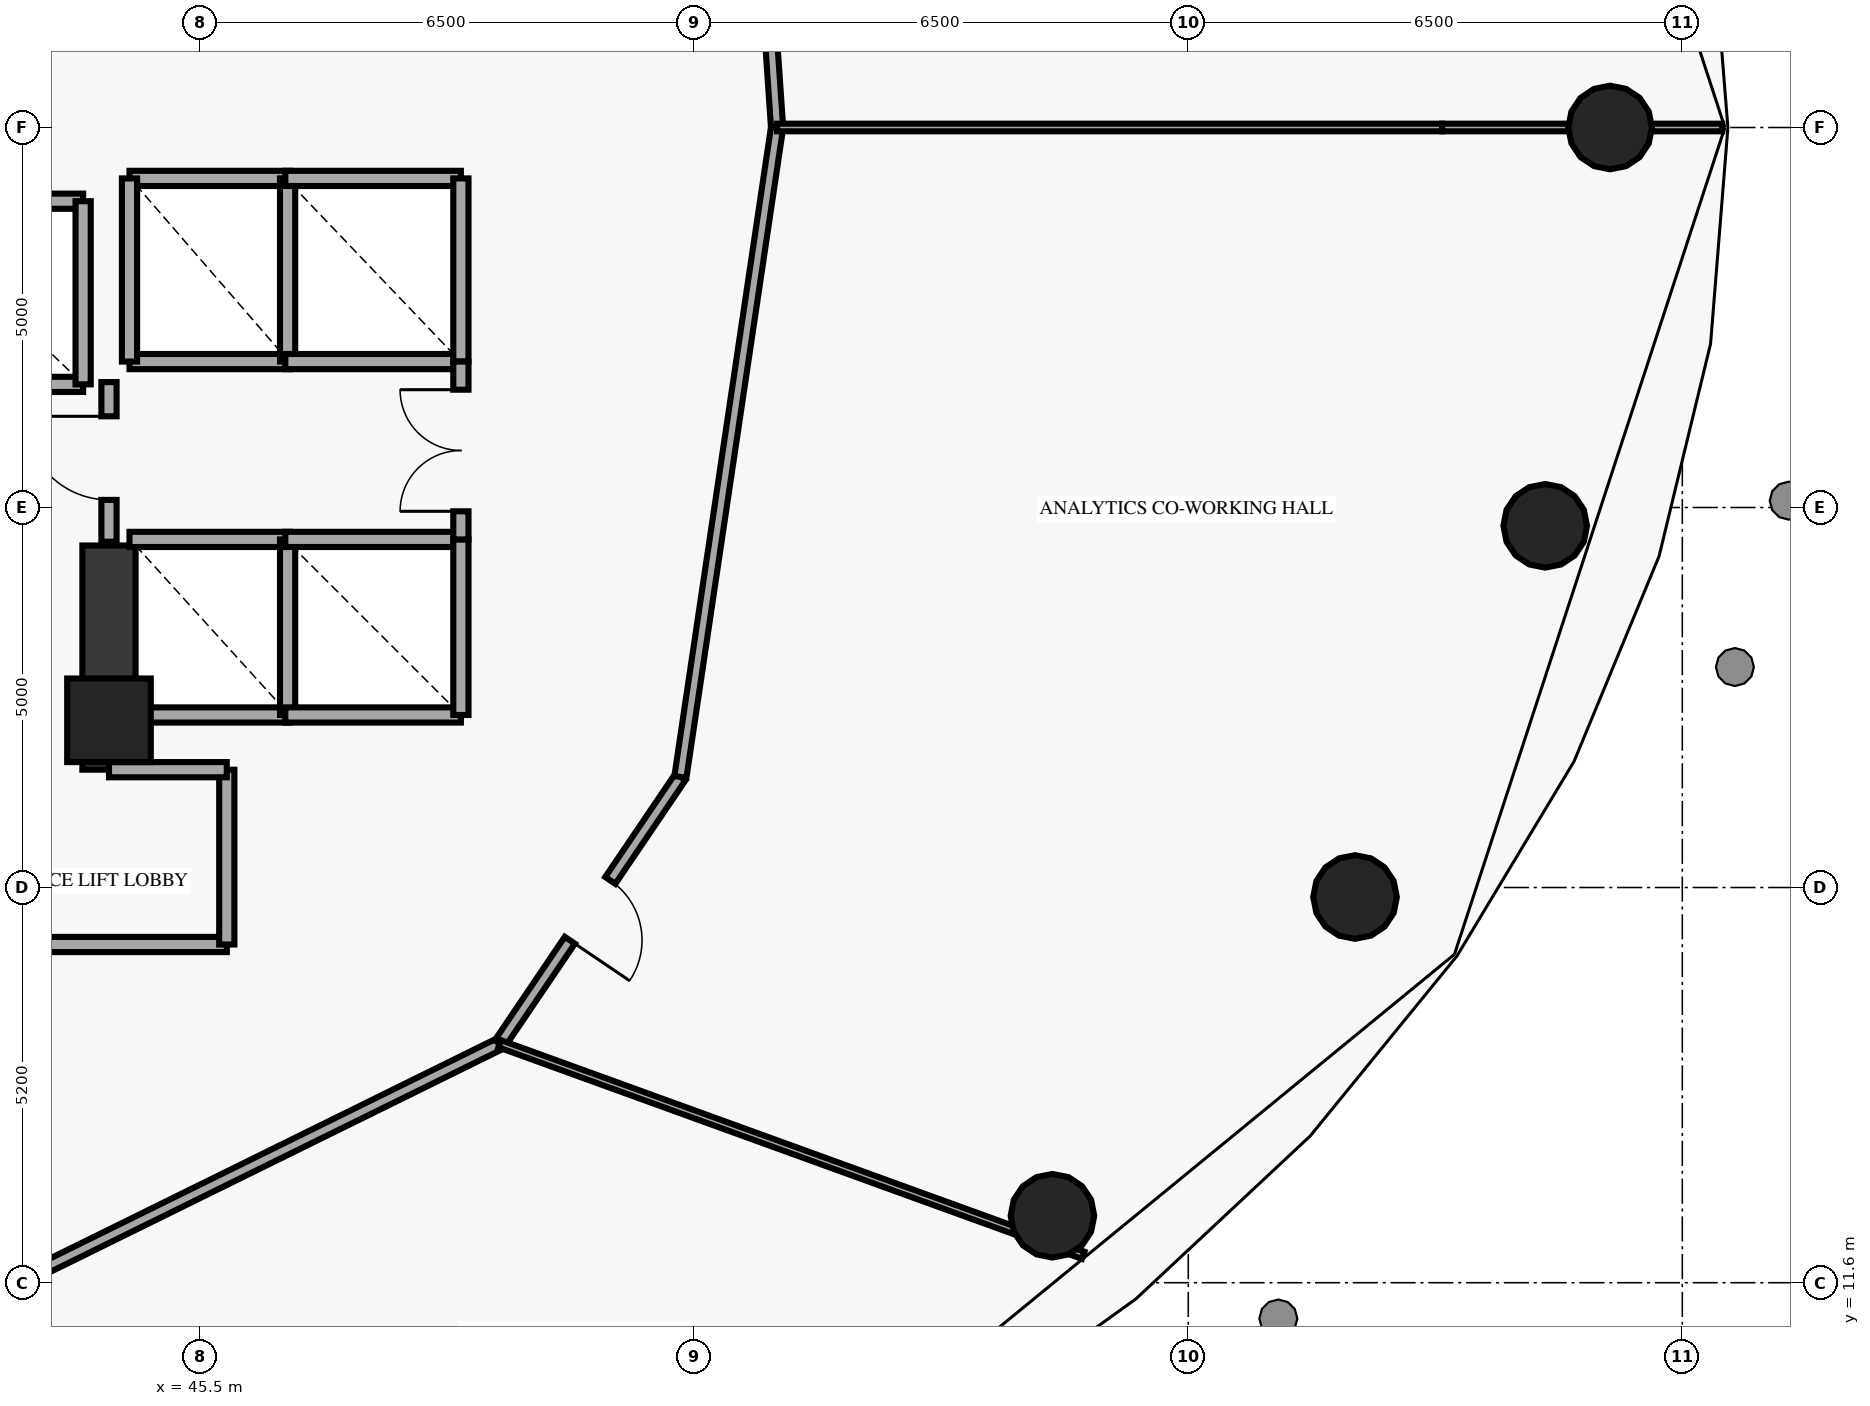
"""IFC4 building model, lengths in metres.
Left out: names, types, materials, properties, quantities, classifications, styles, units other than length and angle.
Written with IfcOpenShell. Run it as: python <this file> out.ifc"""

import sys

from ifc_helpers import new_model, si_unit, direction, frame, frame_2d, origin, origin_2d, place, context, subcontext, project, spatial, rectangle, circle, extrude, element, fill, save


model = new_model("IFC4")
c1 = context("Model", 3, precision=1e-05, world=origin(), true_north=direction((0.0, 1.0)))
c2 = subcontext(c1, "Body", "Model", "MODEL_VIEW")
j1 = project(units=[si_unit("LENGTHUNIT", "METRE"), si_unit("PLANEANGLEUNIT", "RADIAN")], contexts=[c1])
p1 = place(None, origin())
s1 = spatial("IfcSite", under=j1, at=p1, CompositionType="ELEMENT")
p2 = place(p1, origin())
s2 = spatial("IfcBuilding", under=s1, at=p2, CompositionType="ELEMENT")
p3 = place(p2, frame((0.0, 0.0, 65.55)))
s3 = spatial("IfcBuildingStorey", under=s2, at=p3, CompositionType="ELEMENT", Elevation=65.55)
p4 = place(p3, frame((44.3, 19.0, 0.0), z_axis=(0.0, 0.0, 1.0), x_axis=(1.0, 0.0, 0.0)))
e1 = element("IfcColumn", 1, at=p4, inside=s3, PredefinedType="PILASTER", context=c2, shape_type="SweptSolid", body=[
    extrude(rectangle(XDim=1.1, YDim=1.1, at=origin_2d()), origin(), (0.0, 0.0, 1.0), 3.8),
])
for number, where, z_axis, x_axis in (
    (2, (64.05, 26.8, 0.0), (0.0, 0.0, 1.0), (1.0, 0.0, 0.0)),
    (3, (56.713, 12.481, 0.0), (0.0, 0.0, 1.0), (1.0, 0.0, 0.0)),
    (4, (60.694, 16.675, 0.0), (0.0, 0.0, 1.0), (1.0, 0.0, 0.0)),
    (5, (63.196, 21.559, 0.0), (0.0, 0.0, 1.0), (1.0, 0.0, 0.0)),
):
    element("IfcColumn", number, at=place(p3, frame(where, z_axis=z_axis, x_axis=x_axis)), inside=s3, PredefinedType="COLUMN", context=c2, shape_type="SweptSolid", body=[
        extrude(circle(Radius=0.55, at=origin_2d()), origin(), (0.0, 0.0, 1.0), 3.8),
    ])
p5 = place(p3, frame((44.3, 18.35, 0.0), z_axis=(0.0, 0.0, 1.0), x_axis=(0.0, 1.0, 0.0)))
e6 = element("IfcWall", 6, at=p5, inside=s3, PredefinedType="SHEAR", context=c2, shape_type="SweptSolid", body=[
    extrude(rectangle(XDim=2.95, YDim=0.7, at=frame_2d((1.475, 0.0))), origin(), (0.0, 0.0, 1.0), 3.8),
])
for number, where, z_axis, x_axis in (
    (7, (44.57, 23.72, 0.0), (0.0, 0.0, 1.0), (1.0, 0.0, 0.0)),
    (8, (44.57, 26.13, 0.0), (0.0, 0.0, 1.0), (1.0, 0.0, 0.0)),
):
    element("IfcWall", number, at=place(p3, frame(where, z_axis=z_axis, x_axis=x_axis)), inside=s3, PredefinedType="SOLIDWALL", context=c2, shape_type="SweptSolid", body=[
        extrude(rectangle(XDim=2.11, YDim=0.2, at=frame_2d((1.055, 0.0))), origin(), (0.0, 0.0, 1.0), 3.8),
    ])
for number, where, z_axis, x_axis in (
    (9, (44.57, 23.72, 0.0), (0.0, 0.0, 1.0), (0.0, 1.0, 0.0)),
    (10, (46.65, 23.72, 0.0), (0.0, 0.0, 1.0), (0.0, 1.0, 0.0)),
):
    element("IfcWall", number, at=place(p3, frame(where, z_axis=z_axis, x_axis=x_axis)), inside=s3, PredefinedType="SOLIDWALL", context=c2, shape_type="SweptSolid", body=[
        extrude(rectangle(XDim=2.41, YDim=0.2, at=frame_2d((1.205, 0.0))), origin(), (0.0, 0.0, 1.0), 3.8),
    ])
for number, where, z_axis, x_axis in (
    (11, (46.62, 23.72, 0.0), (0.0, 0.0, 1.0), (1.0, 0.0, 0.0)),
    (12, (46.62, 26.13, 0.0), (0.0, 0.0, 1.0), (1.0, 0.0, 0.0)),
):
    element("IfcWall", number, at=place(p3, frame(where, z_axis=z_axis, x_axis=x_axis)), inside=s3, PredefinedType="SOLIDWALL", context=c2, shape_type="SweptSolid", body=[
        extrude(rectangle(XDim=2.31, YDim=0.2, at=frame_2d((1.155, 0.0))), origin(), (0.0, 0.0, 1.0), 3.8),
    ])
p6 = place(p3, frame((48.93, 23.72, 0.0), z_axis=(0.0, 0.0, 1.0), x_axis=(0.0, 1.0, 0.0)))
e13 = element("IfcWall", 13, at=p6, inside=s3, PredefinedType="SOLIDWALL", context=c2, shape_type="SweptSolid", body=[
    extrude(rectangle(XDim=2.41, YDim=0.2, at=frame_2d((1.205, 0.0))), origin(), (0.0, 0.0, 1.0), 3.8),
])
for number, where, z_axis, x_axis in (
    (14, (44.57, 19.07, 0.0), (0.0, 0.0, 1.0), (1.0, 0.0, 0.0)),
    (15, (44.57, 21.38, 0.0), (0.0, 0.0, 1.0), (1.0, 0.0, 0.0)),
):
    element("IfcWall", number, at=place(p3, frame(where, z_axis=z_axis, x_axis=x_axis)), inside=s3, PredefinedType="SOLIDWALL", context=c2, shape_type="SweptSolid", body=[
        extrude(rectangle(XDim=2.11, YDim=0.2, at=frame_2d((1.055, 0.0))), origin(), (0.0, 0.0, 1.0), 3.8),
    ])
for number, where, z_axis, x_axis in (
    (16, (46.65, 19.07, 0.0), (0.0, 0.0, 1.0), (0.0, 1.0, 0.0)),
    (17, (46.62, 19.07, 0.0), (0.0, 0.0, 1.0), (1.0, 0.0, 0.0)),
    (18, (46.62, 21.38, 0.0), (0.0, 0.0, 1.0), (1.0, 0.0, 0.0)),
    (19, (48.93, 19.07, 0.0), (0.0, 0.0, 1.0), (0.0, 1.0, 0.0)),
):
    element("IfcWall", number, at=place(p3, frame(where, z_axis=z_axis, x_axis=x_axis)), inside=s3, PredefinedType="SOLIDWALL", context=c2, shape_type="SweptSolid", body=[
        extrude(rectangle(XDim=2.31, YDim=0.2, at=frame_2d((1.155, 0.0))), origin(), (0.0, 0.0, 1.0), 3.8),
    ])
for number, where, z_axis, x_axis in (
    (20, (41.46, 23.42, 0.0), (0.0, 0.0, 1.0), (1.0, 0.0, 0.0)),
    (21, (41.46, 25.83, 0.0), (0.0, 0.0, 1.0), (1.0, 0.0, 0.0)),
):
    element("IfcWall", number, at=place(p3, frame(where, z_axis=z_axis, x_axis=x_axis)), inside=s3, PredefinedType="SOLIDWALL", context=c2, shape_type="SweptSolid", body=[
        extrude(rectangle(XDim=2.5, YDim=0.2, at=frame_2d((1.25, 0.0))), origin(), (0.0, 0.0, 1.0), 3.8),
    ])
p7 = place(p3, frame((43.96, 23.42, 0.0), z_axis=(0.0, 0.0, 1.0), x_axis=(0.0, 1.0, 0.0)))
e22 = element("IfcWall", 22, at=p7, inside=s3, PredefinedType="SOLIDWALL", context=c2, shape_type="SweptSolid", body=[
    extrude(rectangle(XDim=2.41, YDim=0.2, at=frame_2d((1.205, 0.0))), origin(), (0.0, 0.0, 1.0), 3.8),
])
p8 = place(p3, frame((48.93, 21.38, 0.0), z_axis=(0.0, 0.0, 1.0), x_axis=(0.0, 1.0, 0.0)))
e23 = element("IfcWall", 23, at=p8, inside=s3, PredefinedType="SOLIDWALL", context=c2, shape_type="SweptSolid", body=[
    extrude(rectangle(XDim=2.34, YDim=0.2, at=frame_2d((1.17, 0.0))), origin(), (0.0, 0.0, 1.0), 3.8),
])
p9 = place(p8, frame((0.37, 0.0, 0.0)))
e24 = element("IfcOpeningElement", 24, at=p9, cuts=e23, PredefinedType="OPENING", context=c2, shape_type="SweptSolid", body=[
    extrude(rectangle(XDim=1.6, YDim=2.2, at=frame_2d((0.8, 1.1))), frame((0.0, 0.11, 0.0), z_axis=(0.0, -1.0, 0.0), x_axis=(1.0, 0.0, 0.0)), (0.0, 0.0, 1.0), 0.22),
])
p10 = place(p3, frame((44.3, 21.35, 0.0), z_axis=(0.0, 0.0, 1.0), x_axis=(0.0, 1.0, 0.0)))
e25 = element("IfcWall", 25, at=p10, inside=s3, PredefinedType="SOLIDWALL", context=c2, shape_type="SweptSolid", body=[
    extrude(rectangle(XDim=2.1, YDim=0.2, at=frame_2d((1.05, 0.0))), origin(), (0.0, 0.0, 1.0), 3.02),
])
p11 = place(p10, frame((0.55, 0.0, 0.0)))
e26 = element("IfcOpeningElement", 26, at=p11, cuts=e25, PredefinedType="OPENING", context=c2, shape_type="SweptSolid", body=[
    extrude(rectangle(XDim=1.1, YDim=2.15, at=frame_2d((0.55, 1.075))), frame((0.0, 0.11, 0.0), z_axis=(0.0, -1.0, 0.0), x_axis=(1.0, 0.0, 0.0)), (0.0, 0.0, 1.0), 0.22),
])
p12 = place(p3, frame((41.35, 16.05, 0.0), z_axis=(0.0, 0.0, 1.0), x_axis=(1.0, 0.0, 0.0)))
e27 = element("IfcWall", 27, at=p12, inside=s3, PredefinedType="SOLIDWALL", context=c2, shape_type="SweptSolid", body=[
    extrude(rectangle(XDim=4.5, YDim=0.2, at=frame_2d((2.25, 0.0))), origin(), (0.0, 0.0, 1.0), 3.8),
])
p13 = place(p3, frame((45.85, 16.05, 0.0), z_axis=(0.0, 0.0, 1.0), x_axis=(0.0, 1.0, 0.0)))
e28 = element("IfcWall", 28, at=p13, inside=s3, PredefinedType="SOLIDWALL", context=c2, shape_type="SweptSolid", body=[
    extrude(rectangle(XDim=2.3, YDim=0.2, at=frame_2d((1.15, 0.0))), origin(), (0.0, 0.0, 1.0), 3.8),
])
p14 = place(p3, frame((44.3, 18.35, 0.0), z_axis=(0.0, 0.0, 1.0), x_axis=(1.0, 0.0, 0.0)))
e29 = element("IfcWall", 29, at=p14, inside=s3, PredefinedType="SOLIDWALL", context=c2, shape_type="SweptSolid", body=[
    extrude(rectangle(XDim=1.55, YDim=0.2, at=frame_2d((0.775, 0.0))), origin(), (0.0, 0.0, 1.0), 3.8),
])
p15 = place(p3, frame((52.798, 31.069, 0.0), z_axis=(0.0, 0.0, 1.0), x_axis=(0.068238144639, -0.99766906117, 0.0)))
e30 = element("IfcWall", 30, at=p15, inside=s3, PredefinedType="PARTITIONING", context=c2, shape_type="SweptSolid", body=[
    extrude(rectangle(XDim=4.279, YDim=0.16, at=frame_2d((2.14, 0.0))), origin(), (0.0, 0.0, 1.0), 3.8),
])
p16 = place(p15, frame((1.664, 0.0, 0.0)))
e31 = element("IfcOpeningElement", 31, at=p16, cuts=e30, PredefinedType="OPENING", context=c2, shape_type="SweptSolid", body=[
    extrude(rectangle(XDim=0.95, YDim=2.15, at=frame_2d((0.475, 1.075))), frame((0.0, 0.09, 0.0), z_axis=(0.0, -1.0, 0.0), x_axis=(1.0, 0.0, 0.0)), (0.0, 0.0, 1.0), 0.18),
])
p17 = place(p3, frame((42.582, 11.365, 0.0), z_axis=(0.0, 0.0, 1.0), x_axis=(0.897055406153, 0.441918090025, 0.0)))
e32 = element("IfcWall", 32, at=p17, inside=s3, PredefinedType="PARTITIONING", context=c2, shape_type="SweptSolid", body=[
    extrude(rectangle(XDim=7.646, YDim=0.16, at=frame_2d((3.823, 0.0))), origin(), (0.0, 0.0, 1.0), 3.8),
])
p18 = place(p3, frame((51.818, 18.255, 0.0), z_axis=(0.0, 0.0, 1.0), x_axis=(-0.560652063277, -0.828051486288, 0.0)))
e33 = element("IfcWall", 33, at=p18, inside=s3, PredefinedType="PARTITIONING", context=c2, shape_type="SweptSolid", body=[
    extrude(rectangle(XDim=4.24, YDim=0.16, at=frame_2d((2.12, 0.0))), origin(), (0.0, 0.0, 1.0), 3.8),
])
p19 = place(p18, frame((1.645, 0.0, 0.0)))
e34 = element("IfcOpeningElement", 34, at=p19, cuts=e33, PredefinedType="OPENING", context=c2, shape_type="SweptSolid", body=[
    extrude(rectangle(XDim=0.95, YDim=2.15, at=frame_2d((0.475, 1.075))), frame((0.0, 0.09, 0.0), z_axis=(0.0, -1.0, 0.0), x_axis=(1.0, 0.0, 0.0)), (0.0, 0.0, 1.0), 0.18),
])
p20 = place(p3, frame((51.818, 18.255, 0.0), z_axis=(0.0, 0.0, 1.0), x_axis=(0.147230717418, 0.989102176647, 0.0)))
e35 = element("IfcWall", 35, at=p20, inside=s3, PredefinedType="PARTITIONING", context=c2, shape_type="SweptSolid", body=[
    extrude(rectangle(XDim=8.639, YDim=0.16, at=frame_2d((4.32, 0.0))), origin(), (0.0, 0.0, 1.0), 3.8),
])
p21 = place(p3, frame((53.09, 26.8, 0.0), z_axis=(0.0, 0.0, 1.0), x_axis=(1.0, 0.0, 0.0)))
e36 = element("IfcWall", 36, at=p21, inside=s3, PredefinedType="MOVABLE", context=c2, shape_type="SweptSolid", body=[
    extrude(rectangle(XDim=8.75, YDim=0.1, at=frame_2d((4.375, 0.0))), origin(), (0.0, 0.0, 1.0), 3.8),
])
p22 = place(p3, frame((61.84, 26.8, 0.0), z_axis=(0.0, 0.0, 1.0), x_axis=(1.0, 0.0, 0.0)))
e37 = element("IfcWall", 37, at=p22, inside=s3, PredefinedType="MOVABLE", context=c2, shape_type="SweptSolid", body=[
    extrude(rectangle(XDim=2.216, YDim=0.1, at=frame_2d((1.108, 0.0))), origin(), (0.0, 0.0, 1.0), 2.79),
])
p23 = place(p3, frame((64.056, 26.8, 0.0), z_axis=(0.0, 0.0, 1.0), x_axis=(1.0, 0.0, 0.0)))
e38 = element("IfcWall", 38, at=p23, inside=s3, PredefinedType="MOVABLE", context=c2, shape_type="SweptSolid", body=[
    extrude(rectangle(XDim=1.469, YDim=0.1, at=frame_2d((0.734, 0.0))), origin(), (0.0, 0.0, 1.0), 3.8),
])
p24 = place(p3, frame((49.441, 14.744, 0.0), z_axis=(0.0, 0.0, 1.0), x_axis=(0.940120376518, -0.340842599533, 0.0)))
e39 = element("IfcWall", 39, at=p24, inside=s3, PredefinedType="MOVABLE", context=c2, shape_type="SweptSolid", body=[
    extrude(rectangle(XDim=8.165, YDim=0.1, at=frame_2d((4.083, 0.0))), origin(), (0.0, 0.0, 1.0), 3.8),
])
p25 = place(p9, origin())
e40 = element("IfcDoor", 40, at=p25, inside=s3, OperationType="DOUBLE_DOOR_SINGLE_SWING", PredefinedType="DOOR", context=c2, shape_type="SweptSolid", body=[
    extrude(rectangle(XDim=1.6, YDim=2.2, at=frame_2d((0.8, 1.1))), frame((0.0, 0.025, 0.0), z_axis=(0.0, -1.0, 0.0), x_axis=(1.0, 0.0, 0.0)), (0.0, 0.0, 1.0), 0.05),
])
fill(e24, e40)
p26 = place(p11, origin())
e41 = element("IfcDoor", 41, at=p26, inside=s3, OperationType="SINGLE_SWING_RIGHT", PredefinedType="DOOR", context=c2, shape_type="SweptSolid", body=[
    extrude(rectangle(XDim=1.1, YDim=2.15, at=frame_2d((0.55, 1.075))), frame((0.0, 0.025, 0.0), z_axis=(0.0, -1.0, 0.0), x_axis=(1.0, 0.0, 0.0)), (0.0, 0.0, 1.0), 0.05),
])
fill(e26, e41)
p27 = place(p19, origin())
e42 = element("IfcDoor", 42, at=p27, inside=s3, OperationType="SINGLE_SWING_RIGHT", PredefinedType="DOOR", context=c2, shape_type="SweptSolid", body=[
    extrude(rectangle(XDim=0.95, YDim=2.15, at=frame_2d((0.475, 1.075))), frame((0.0, 0.025, 0.0), z_axis=(0.0, -1.0, 0.0), x_axis=(1.0, 0.0, 0.0)), (0.0, 0.0, 1.0), 0.05),
])
fill(e34, e42)
save(model, sys.argv[1])
